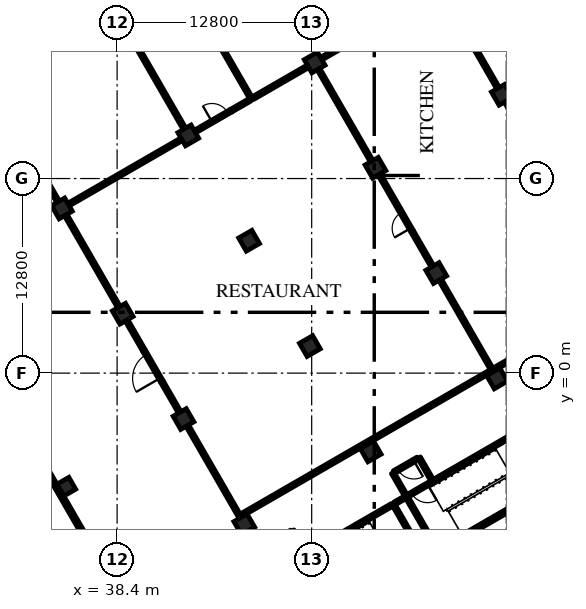
"""IFC4 building model, lengths in metres.
Left out: names, types, materials, properties, quantities, classifications, styles, units other than length and angle.
Written with IfcOpenShell. Run it as: python <this file> out.ifc"""

import sys

from ifc_helpers import new_model, si_unit, direction, frame, frame_2d, origin, origin_2d, place, context, subcontext, project, spatial, rectangle, extrude, element, fill, save


model = new_model("IFC4")
c1 = context("Model", 3, precision=1e-05, world=origin(), true_north=direction((0.0, 1.0)))
c2 = subcontext(c1, "Body", "Model", "MODEL_VIEW")
j1 = project(units=[si_unit("LENGTHUNIT", "METRE"), si_unit("PLANEANGLEUNIT", "RADIAN")], contexts=[c1])
p1 = place(None, origin())
s1 = spatial("IfcSite", under=j1, at=p1, CompositionType="ELEMENT")
p2 = place(p1, origin())
s2 = spatial("IfcBuilding", under=s1, at=p2, CompositionType="ELEMENT")
p3 = place(p2, origin())
s3 = spatial("IfcBuildingStorey", under=s2, at=p3, CompositionType="ELEMENT", Elevation=0.0)
for number, where, z_axis, x_axis in (
    (1, (46.768, -9.949, -0.3), (0.0, 0.0, 1.0), (-0.5, 0.866, 0.0)),
    (2, (55.082, -5.149, -0.3), (0.0, 0.0, 1.0), (-0.5, 0.866, 0.0)),
    (3, (63.396, -0.349, -0.3), (0.0, 0.0, 1.0), (-0.5, 0.866, 0.0)),
):
    element("IfcColumn", number, at=place(p3, frame(where, z_axis=z_axis, x_axis=x_axis)), inside=s3, PredefinedType="COLUMN", context=c2, shape_type="SweptSolid", body=[
        extrude(rectangle(XDim=1.0, YDim=1.0, at=origin_2d()), origin(), (0.0, 0.0, 1.0), 6.3),
    ])
p4 = place(p3, frame((35.061, -7.471, -0.3), z_axis=(0.0, 0.0, 1.0), x_axis=(-0.5, 0.866025403784, 0.0)))
e4 = element("IfcColumn", 4, at=p4, inside=s3, PredefinedType="COLUMN", context=c2, shape_type="SweptSolid", body=[
    extrude(rectangle(XDim=0.9, YDim=0.9, at=origin_2d()), origin(), (0.0, 0.0, 1.0), 6.3),
])
for number, where, z_axis, x_axis in (
    (5, (42.768, -3.021, -0.3), (0.0, 0.0, 1.0), (-0.5, 0.866, 0.0)),
    (6, (51.082, 1.779, -0.3), (0.0, 0.0, 1.0), (-0.5, 0.866, 0.0)),
    (7, (59.396, 6.579, -0.3), (0.0, 0.0, 1.0), (-0.5, 0.866, 0.0)),
    (8, (38.768, 3.908, -0.3), (0.0, 0.0, 1.0), (-0.5, 0.866, 0.0)),
    (9, (47.082, 8.708, -0.3), (0.0, 0.0, 1.0), (-0.5, 0.866, 0.0)),
    (10, (55.396, 13.508, -0.3), (0.0, 0.0, 1.0), (-0.5, 0.866, 0.0)),
    (11, (63.71, 18.308, -0.3), (0.0, 0.0, 1.0), (-0.5, 0.866, 0.0)),
    (12, (34.768, 10.836, -0.3), (0.0, 0.0, 1.0), (-0.5, 0.866, 0.0)),
    (13, (43.082, 15.636, -0.3), (0.0, 0.0, 1.0), (-0.5, 0.866, 0.0)),
    (14, (51.396, 20.436, -0.3), (0.0, 0.0, 1.0), (-0.5, 0.866, 0.0)),
):
    element("IfcColumn", number, at=place(p3, frame(where, z_axis=z_axis, x_axis=x_axis)), inside=s3, PredefinedType="COLUMN", context=c2, shape_type="SweptSolid", body=[
        extrude(rectangle(XDim=1.0, YDim=1.0, at=origin_2d()), origin(), (0.0, 0.0, 1.0), 6.3),
    ])
p5 = place(p3, frame((38.988, -15.422, 0.0), z_axis=(0.0, 0.0, 1.0), x_axis=(-0.500002395808, 0.866024020559, 0.0)))
e15 = element("IfcWall", 15, at=p5, inside=s3, PredefinedType="SOLIDWALL", context=c2, shape_type="SweptSolid", body=[
    extrude(rectangle(XDim=11.5, YDim=0.25, at=frame_2d((5.75, 0.0))), origin(), (0.0, 0.0, 1.0), 5.7),
])
p6 = place(p3, frame((66.944, -7.394, 0.0), z_axis=(0.0, 0.0, 1.0), x_axis=(-0.866026575979, -0.499997969693, 0.0)))
e16 = element("IfcWall", 16, at=p6, inside=s3, PredefinedType="SOLIDWALL", context=c2, shape_type="SweptSolid", body=[
    extrude(rectangle(XDim=6.75, YDim=0.25, at=frame_2d((3.375, 0.0))), origin(), (0.0, 0.0, 1.0), 5.7),
])
p7 = place(p3, frame((58.117, -11.306, 0.0), z_axis=(0.0, 0.0, 1.0), x_axis=(-0.499933790963, 0.866063626216, 0.0)))
e17 = element("IfcWall", 17, at=p7, inside=s3, PredefinedType="SOLIDWALL", context=c2, shape_type="SweptSolid", body=[
    extrude(rectangle(XDim=3.1, YDim=0.2, at=frame_2d((1.55, 0.0))), origin(), (0.0, 0.0, 1.0), 5.7),
])
p8 = place(p3, frame((59.433, -11.585, 0.0), z_axis=(0.0, 0.0, 1.0), x_axis=(-0.49999894854, 0.866026010844, 0.0)))
e18 = element("IfcWall", 18, at=p8, inside=s3, PredefinedType="SOLIDWALL", context=c2, shape_type="SweptSolid", body=[
    extrude(rectangle(XDim=4.0, YDim=0.2, at=frame_2d((2.0, 0.0))), origin(), (0.0, 0.0, 1.0), 5.7),
])
p9 = place(p3, frame((50.722, -11.996, 0.0), z_axis=(0.0, 0.0, 1.0), x_axis=(0.866027239912, 0.49999681972, 0.0)))
e19 = element("IfcWall", 19, at=p9, inside=s3, PredefinedType="SOLIDWALL", context=c2, shape_type="SweptSolid", body=[
    extrude(rectangle(XDim=6.65, YDim=0.2, at=frame_2d((3.325, 0.0))), origin(), (0.0, 0.0, 1.0), 5.7),
])
p10 = place(p3, frame((59.035, -7.196, 0.0), z_axis=(0.0, 0.0, 1.0), x_axis=(-0.866002029911, -0.500040482552, 0.0)))
e20 = element("IfcWall", 20, at=p10, inside=s3, PredefinedType="SOLIDWALL", context=c2, shape_type="SweptSolid", body=[
    extrude(rectangle(XDim=1.75, YDim=0.2, at=frame_2d((0.875, 0.0))), origin(), (0.0, 0.0, 1.0), 5.7),
])
p11 = place(p10, frame((0.25, 0.0, 0.0)))
e21 = element("IfcOpeningElement", 21, at=p11, cuts=e20, PredefinedType="OPENING", context=c2, shape_type="SweptSolid", body=[
    extrude(rectangle(XDim=1.2, YDim=2.1, at=frame_2d((0.6, 1.05))), frame((0.0, 0.11, 0.0), z_axis=(0.0, -1.0, 0.0), x_axis=(1.0, 0.0, 0.0)), (0.0, 0.0, 1.0), 0.22),
])
p12 = place(p3, frame((59.035, -7.196, 0.0), z_axis=(0.0, 0.0, 1.0), x_axis=(0.866027239912, 0.49999681972, 0.0)))
e22 = element("IfcWall", 22, at=p12, inside=s3, PredefinedType="SOLIDWALL", context=c2, shape_type="SweptSolid", body=[
    extrude(rectangle(XDim=6.65, YDim=0.2, at=frame_2d((3.325, 0.0))), origin(), (0.0, 0.0, 1.0), 5.7),
])
for number, where, z_axis, x_axis in (
    (23, (57.383, -8.035, 0.0), (0.0, 0.0, 1.0), (-0.5, 0.866, 0.0)),
    (24, (59.115, -7.035, 0.0), (0.0, 0.0, 1.0), (-0.5, 0.866, 0.0)),
):
    element("IfcWall", number, at=place(p3, frame(where, z_axis=z_axis, x_axis=x_axis)), inside=s3, PredefinedType="PARTITIONING", context=c2, shape_type="SweptSolid", body=[
        extrude(rectangle(XDim=1.7, YDim=0.2, at=frame_2d((0.85, 0.0))), origin(), (0.0, 0.0, 1.0), 5.1),
    ])
p13 = place(p3, frame((58.179, -5.613, 0.0), z_axis=(0.0, 0.0, 1.0), x_axis=(-0.866047807691, -0.499961193289, 0.0)))
e25 = element("IfcWall", 25, at=p13, inside=s3, PredefinedType="PARTITIONING", context=c2, shape_type="SweptSolid", body=[
    extrude(rectangle(XDim=1.8, YDim=0.2, at=frame_2d((0.9, 0.0))), origin(), (0.0, 0.0, 1.0), 5.1),
])
p14 = place(p13, frame((0.3, 0.0, 0.0)))
e26 = element("IfcOpeningElement", 26, at=p14, cuts=e25, PredefinedType="OPENING", context=c2, shape_type="SweptSolid", body=[
    extrude(rectangle(XDim=1.2, YDim=2.1, at=frame_2d((0.6, 1.05))), frame((0.0, 0.11, 0.0), z_axis=(0.0, -1.0, 0.0), x_axis=(1.0, 0.0, 0.0)), (0.0, 0.0, 1.0), 0.22),
])
p15 = place(p3, frame((46.456, -9.407, 0.0), z_axis=(0.0, 0.0, 1.0), x_axis=(-0.500004234368, 0.866022959057, 0.0)))
e27 = element("IfcWall", 27, at=p15, inside=s3, PredefinedType="PARTITIONING", context=c2, shape_type="SweptSolid", body=[
    extrude(rectangle(XDim=6.875, YDim=0.2, at=frame_2d((3.438, 0.0))), origin(), (0.0, 0.0, 1.0), 5.1),
])
p16 = place(p3, frame((42.518, -2.588, 0.0), z_axis=(0.0, 0.0, 1.0), x_axis=(-0.500016218704, 0.866016039709, 0.0)))
e28 = element("IfcWall", 28, at=p16, inside=s3, PredefinedType="PARTITIONING", context=c2, shape_type="SweptSolid", body=[
    extrude(rectangle(XDim=2.35, YDim=0.2, at=frame_2d((1.175, 0.0))), origin(), (0.0, 0.0, 1.0), 5.1),
])
p17 = place(p3, frame((41.343, -0.552, 0.0), z_axis=(0.0, 0.0, 1.0), x_axis=(-0.499952165731, 0.866053019151, 0.0)))
e29 = element("IfcWall", 29, at=p17, inside=s3, PredefinedType="PARTITIONING", context=c2, shape_type="SweptSolid", body=[
    extrude(rectangle(XDim=2.3, YDim=0.2, at=frame_2d((1.15, 0.0))), origin(), (0.0, 0.0, 1.0), 5.1),
])
p18 = place(p17, frame((0.25, 0.0, 0.0)))
e30 = element("IfcOpeningElement", 30, at=p18, cuts=e29, PredefinedType="OPENING", context=c2, shape_type="SweptSolid", body=[
    extrude(rectangle(XDim=1.8, YDim=2.1, at=frame_2d((0.9, 1.05))), frame((0.0, 0.11, 0.0), z_axis=(0.0, -1.0, 0.0), x_axis=(1.0, 0.0, 0.0)), (0.0, 0.0, 1.0), 0.22),
])
p19 = place(p3, frame((40.193, 1.439, 0.0), z_axis=(0.0, 0.0, 1.0), x_axis=(-0.500016218704, 0.866016039709, 0.0)))
e31 = element("IfcWall", 31, at=p19, inside=s3, PredefinedType="PARTITIONING", context=c2, shape_type="SweptSolid", body=[
    extrude(rectangle(XDim=2.35, YDim=0.2, at=frame_2d((1.175, 0.0))), origin(), (0.0, 0.0, 1.0), 5.1),
])
p20 = place(p3, frame((38.518, 4.341, 0.0), z_axis=(0.0, 0.0, 1.0), x_axis=(-0.499995173006, 0.866028190633, 0.0)))
e32 = element("IfcWall", 32, at=p20, inside=s3, PredefinedType="PARTITIONING", context=c2, shape_type="SweptSolid", body=[
    extrude(rectangle(XDim=7.0, YDim=0.2, at=frame_2d((3.5, 0.0))), origin(), (0.0, 0.0, 1.0), 5.1),
])
p21 = place(p3, frame((34.518, 11.269, 0.0), z_axis=(0.0, 0.0, 1.0), x_axis=(-0.500016218704, 0.866016039709, 0.0)))
e33 = element("IfcWall", 33, at=p21, inside=s3, PredefinedType="PARTITIONING", context=c2, shape_type="SweptSolid", body=[
    extrude(rectangle(XDim=2.35, YDim=0.2, at=frame_2d((1.175, 0.0))), origin(), (0.0, 0.0, 1.0), 5.1),
])
p22 = place(p3, frame((42.832, 16.069, 0.0), z_axis=(0.0, 0.0, 1.0), x_axis=(-0.499995173006, 0.866028190633, 0.0)))
e34 = element("IfcWall", 34, at=p22, inside=s3, PredefinedType="PARTITIONING", context=c2, shape_type="SweptSolid", body=[
    extrude(rectangle(XDim=7.0, YDim=0.2, at=frame_2d((3.5, 0.0))), origin(), (0.0, 0.0, 1.0), 5.1),
])
p23 = place(p3, frame((47.239, 18.036, 0.0), z_axis=(0.0, 0.0, 1.0), x_axis=(-0.500014519185, 0.866017020967, 0.0)))
e35 = element("IfcWall", 35, at=p23, inside=s3, PredefinedType="PARTITIONING", context=c2, shape_type="SweptSolid", body=[
    extrude(rectangle(XDim=6.85, YDim=0.2, at=frame_2d((3.425, 0.0))), origin(), (0.0, 0.0, 1.0), 5.1),
])
p24 = place(p3, frame((63.083, 0.192, 0.0), z_axis=(0.0, 0.0, 1.0), x_axis=(-0.499988857673, 0.866031836714, 0.0)))
e36 = element("IfcWall", 36, at=p24, inside=s3, PredefinedType="PARTITIONING", context=c2, shape_type="SweptSolid", body=[
    extrude(rectangle(XDim=6.875, YDim=0.2, at=frame_2d((3.438, 0.0))), origin(), (0.0, 0.0, 1.0), 5.1),
])
p25 = place(p3, frame((59.146, 7.012, 0.0), z_axis=(0.0, 0.0, 1.0), x_axis=(-0.499993606316, 0.866029095148, 0.0)))
e37 = element("IfcWall", 37, at=p25, inside=s3, PredefinedType="PARTITIONING", context=c2, shape_type="SweptSolid", body=[
    extrude(rectangle(XDim=2.65, YDim=0.2, at=frame_2d((1.325, 0.0))), origin(), (0.0, 0.0, 1.0), 5.1),
])
p26 = place(p3, frame((57.821, 9.307, 0.0), z_axis=(0.0, 0.0, 1.0), x_axis=(-0.500062241894, 0.865989465428, 0.0)))
e38 = element("IfcWall", 38, at=p26, inside=s3, PredefinedType="PARTITIONING", context=c2, shape_type="SweptSolid", body=[
    extrude(rectangle(XDim=1.7, YDim=0.2, at=frame_2d((0.85, 0.0))), origin(), (0.0, 0.0, 1.0), 5.1),
])
p27 = place(p26, frame((0.25, 0.0, 0.0)))
e39 = element("IfcOpeningElement", 39, at=p27, cuts=e38, PredefinedType="OPENING", context=c2, shape_type="SweptSolid", body=[
    extrude(rectangle(XDim=1.2, YDim=2.1, at=frame_2d((0.6, 1.05))), frame((0.0, 0.11, 0.0), z_axis=(0.0, -1.0, 0.0), x_axis=(1.0, 0.0, 0.0)), (0.0, 0.0, 1.0), 0.22),
])
p28 = place(p3, frame((56.971, 10.78, 0.0), z_axis=(0.0, 0.0, 1.0), x_axis=(-0.499953715521, 0.866052124492, 0.0)))
e40 = element("IfcWall", 40, at=p28, inside=s3, PredefinedType="PARTITIONING", context=c2, shape_type="SweptSolid", body=[
    extrude(rectangle(XDim=2.65, YDim=0.2, at=frame_2d((1.325, 0.0))), origin(), (0.0, 0.0, 1.0), 5.1),
])
p29 = place(p3, frame((55.146, 13.941, 0.0), z_axis=(0.0, 0.0, 1.0), x_axis=(-0.500010275428, 0.866019471182, 0.0)))
e41 = element("IfcWall", 41, at=p29, inside=s3, PredefinedType="PARTITIONING", context=c2, shape_type="SweptSolid", body=[
    extrude(rectangle(XDim=7.0, YDim=0.2, at=frame_2d((3.5, 0.0))), origin(), (0.0, 0.0, 1.0), 5.1),
])
p30 = place(p3, frame((65.285, 15.58, 0.0), z_axis=(0.0, 0.0, 1.0), x_axis=(-0.499993606316, 0.866029095148, 0.0)))
e42 = element("IfcWall", 42, at=p30, inside=s3, PredefinedType="PARTITIONING", context=c2, shape_type="SweptSolid", body=[
    extrude(rectangle(XDim=2.65, YDim=0.2, at=frame_2d((1.325, 0.0))), origin(), (0.0, 0.0, 1.0), 5.1),
])
p31 = place(p3, frame((63.46, 18.74, 0.0), z_axis=(0.0, 0.0, 1.0), x_axis=(-0.499995173006, 0.866028190633, 0.0)))
e43 = element("IfcWall", 43, at=p31, inside=s3, PredefinedType="PARTITIONING", context=c2, shape_type="SweptSolid", body=[
    extrude(rectangle(XDim=7.0, YDim=0.2, at=frame_2d((3.5, 0.0))), origin(), (0.0, 0.0, 1.0), 5.1),
])
p32 = place(p3, frame((46.542, -9.357, 0.0), z_axis=(0.0, 0.0, 1.0), x_axis=(0.866023601547, 0.500003121554, 0.0)))
e44 = element("IfcWall", 44, at=p32, inside=s3, PredefinedType="PARTITIONING", context=c2, shape_type="SweptSolid", body=[
    extrude(rectangle(XDim=19.0, YDim=0.2, at=frame_2d((9.5, 0.0))), origin(), (0.0, 0.0, 1.0), 5.1),
])
p33 = place(p3, frame((63.17, 0.242, 0.0), z_axis=(0.0, 0.0, 1.0), x_axis=(0.866027286158, 0.499996739618, 0.0)))
e45 = element("IfcWall", 45, at=p33, inside=s3, PredefinedType="PARTITIONING", context=c2, shape_type="SweptSolid", body=[
    extrude(rectangle(XDim=9.4, YDim=0.2, at=frame_2d((4.7, 0.0))), origin(), (0.0, 0.0, 1.0), 5.1),
])
p34 = place(p3, frame((35.201, 11.086, 0.0), z_axis=(0.0, 0.0, 1.0), x_axis=(0.866021068297, 0.500007509209, 0.0)))
e46 = element("IfcWall", 46, at=p34, inside=s3, PredefinedType="PARTITIONING", context=c2, shape_type="SweptSolid", body=[
    extrude(rectangle(XDim=8.6, YDim=0.2, at=frame_2d((4.3, 0.0))), origin(), (0.0, 0.0, 1.0), 5.1),
])
p35 = place(p3, frame((43.515, 15.886, 0.0), z_axis=(0.0, 0.0, 1.0), x_axis=(0.866027397988, 0.499996545922, 0.0)))
e47 = element("IfcWall", 47, at=p35, inside=s3, PredefinedType="PARTITIONING", context=c2, shape_type="SweptSolid", body=[
    extrude(rectangle(XDim=2.75, YDim=0.2, at=frame_2d((1.375, 0.0))), origin(), (0.0, 0.0, 1.0), 5.1),
])
p36 = place(p35, frame((1.3, 0.0, 0.0)))
e48 = element("IfcOpeningElement", 48, at=p36, cuts=e47, PredefinedType="OPENING", context=c2, shape_type="SweptSolid", body=[
    extrude(rectangle(XDim=1.2, YDim=2.1, at=frame_2d((0.6, 1.05))), frame((0.0, 0.11, 0.0), z_axis=(0.0, -1.0, 0.0), x_axis=(1.0, 0.0, 0.0)), (0.0, 0.0, 1.0), 0.22),
])
p37 = place(p3, frame((45.896, 17.261, 0.0), z_axis=(0.0, 0.0, 1.0), x_axis=(0.866017369001, 0.500013916395, 0.0)))
e49 = element("IfcWall", 49, at=p37, inside=s3, PredefinedType="PARTITIONING", context=c2, shape_type="SweptSolid", body=[
    extrude(rectangle(XDim=1.45, YDim=0.2, at=frame_2d((0.725, 0.0))), origin(), (0.0, 0.0, 1.0), 5.1),
])
p38 = place(p3, frame((47.325, 18.086, 0.0), z_axis=(0.0, 0.0, 1.0), x_axis=(0.866023935413, 0.500002543286, 0.0)))
e50 = element("IfcWall", 50, at=p38, inside=s3, PredefinedType="PARTITIONING", context=c2, shape_type="SweptSolid", body=[
    extrude(rectangle(XDim=4.2, YDim=0.2, at=frame_2d((2.1, 0.0))), origin(), (0.0, 0.0, 1.0), 5.1),
])
p39 = place(p3, frame((51.829, 20.686, 0.0), z_axis=(0.0, 0.0, 1.0), x_axis=(0.866021068297, 0.500007509209, 0.0)))
e51 = element("IfcWall", 51, at=p39, inside=s3, PredefinedType="PARTITIONING", context=c2, shape_type="SweptSolid", body=[
    extrude(rectangle(XDim=8.6, YDim=0.2, at=frame_2d((4.3, 0.0))), origin(), (0.0, 0.0, 1.0), 5.1),
])
p40 = place(p3, frame((56.654, -8.571, 0.0), z_axis=(0.0, 0.0, 1.0), x_axis=(0.866094119867, 0.499880961361, 0.0)))
e52 = element("IfcWall", 52, at=p40, inside=s3, PredefinedType="PARTITIONING", context=c2, shape_type="SweptSolid", body=[
    extrude(rectangle(XDim=0.8, YDim=0.2, at=frame_2d((0.4, 0.0))), origin(), (0.0, 0.0, 1.0), 5.1),
])
p41 = place(p11, origin())
e53 = element("IfcDoor", 53, at=p41, inside=s3, OperationType="SINGLE_SWING_LEFT", PredefinedType="DOOR", context=c2, shape_type="SweptSolid", body=[
    extrude(rectangle(XDim=1.2, YDim=2.1, at=frame_2d((0.6, 1.05))), frame((0.0, 0.025, 0.0), z_axis=(0.0, -1.0, 0.0), x_axis=(1.0, 0.0, 0.0)), (0.0, 0.0, 1.0), 0.05),
])
fill(e21, e53)
p42 = place(p14, origin())
e54 = element("IfcDoor", 54, at=p42, inside=s3, OperationType="SINGLE_SWING_LEFT", PredefinedType="DOOR", context=c2, shape_type="SweptSolid", body=[
    extrude(rectangle(XDim=1.2, YDim=2.1, at=frame_2d((0.6, 1.05))), frame((0.0, 0.025, 0.0), z_axis=(0.0, -1.0, 0.0), x_axis=(1.0, 0.0, 0.0)), (0.0, 0.0, 1.0), 0.05),
])
fill(e26, e54)
p43 = place(p18, origin())
e55 = element("IfcDoor", 55, at=p43, inside=s3, OperationType="DOUBLE_DOOR_SINGLE_SWING", PredefinedType="DOOR", context=c2, shape_type="SweptSolid", body=[
    extrude(rectangle(XDim=1.8, YDim=2.1, at=frame_2d((0.9, 1.05))), frame((0.0, 0.025, 0.0), z_axis=(0.0, -1.0, 0.0), x_axis=(1.0, 0.0, 0.0)), (0.0, 0.0, 1.0), 0.05),
])
fill(e30, e55)
p44 = place(p27, origin())
e56 = element("IfcDoor", 56, at=p44, inside=s3, OperationType="SINGLE_SWING_LEFT", PredefinedType="DOOR", context=c2, shape_type="SweptSolid", body=[
    extrude(rectangle(XDim=1.2, YDim=2.1, at=frame_2d((0.6, 1.05))), frame((0.0, 0.025, 0.0), z_axis=(0.0, -1.0, 0.0), x_axis=(1.0, 0.0, 0.0)), (0.0, 0.0, 1.0), 0.05),
])
fill(e39, e56)
p45 = place(p36, origin())
e57 = element("IfcDoor", 57, at=p45, inside=s3, OperationType="SINGLE_SWING_LEFT", PredefinedType="DOOR", context=c2, shape_type="SweptSolid", body=[
    extrude(rectangle(XDim=1.2, YDim=2.1, at=frame_2d((0.6, 1.05))), frame((0.0, 0.025, 0.0), z_axis=(0.0, -1.0, 0.0), x_axis=(1.0, 0.0, 0.0)), (0.0, 0.0, 1.0), 0.05),
])
fill(e48, e57)
save(model, sys.argv[1])
